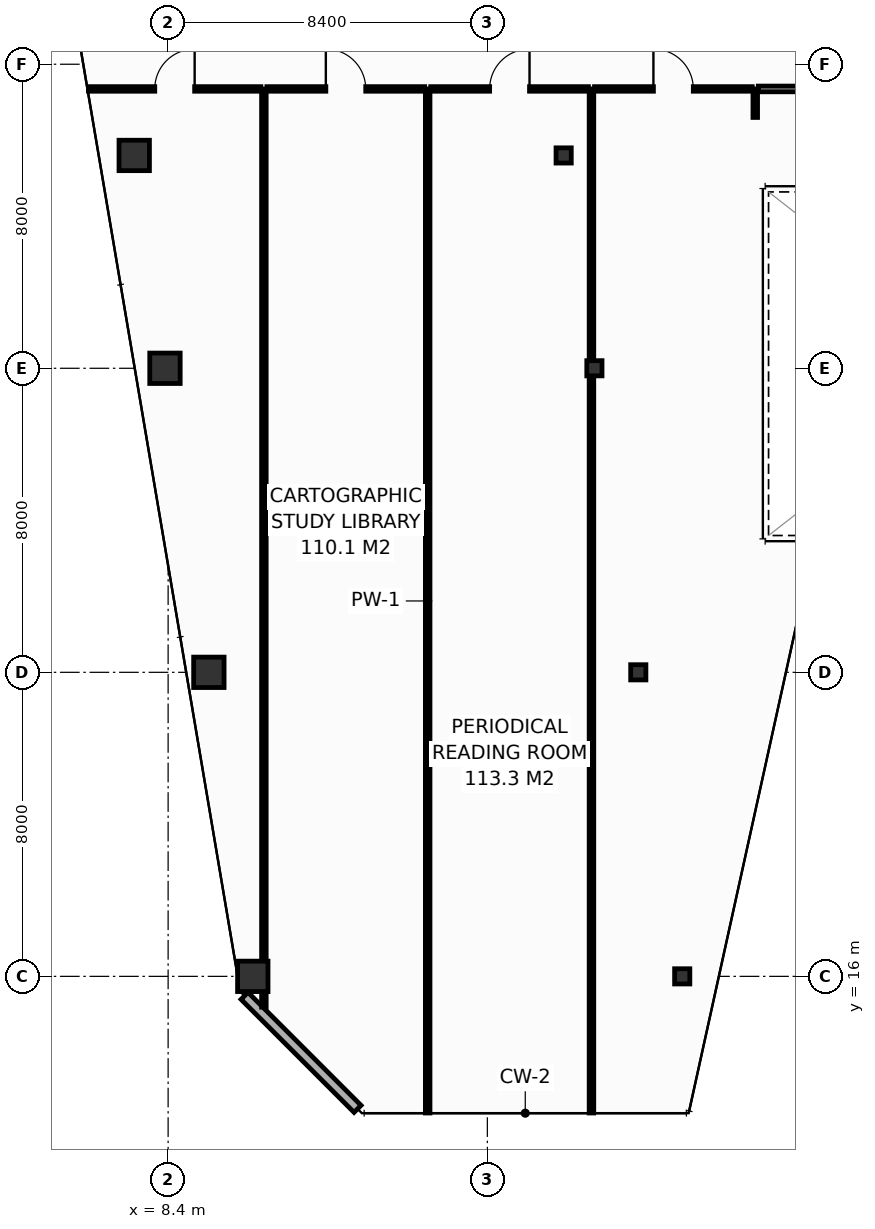
"""IFC4 building model, lengths in metres.
Left out: names, types, materials, properties, quantities, classifications, styles, units other than length and angle.
Written with IfcOpenShell. Run it as: python <this file> out.ifc"""

import sys

from ifc_helpers import new_model, si_unit, direction, frame, frame_2d, origin, origin_2d, place, context, subcontext, project, spatial, rectangle, hollow_rectangle, extrude, element, fill, save


model = new_model("IFC4")
c1 = context("Model", 3, precision=1e-05, world=origin(), true_north=direction((0.0, 1.0)))
c2 = subcontext(c1, "Body", "Model", "MODEL_VIEW")
j1 = project(units=[si_unit("LENGTHUNIT", "METRE"), si_unit("PLANEANGLEUNIT", "RADIAN")], contexts=[c1])
p1 = place(None, origin())
s1 = spatial("IfcSite", under=j1, at=p1, CompositionType="ELEMENT")
p2 = place(p1, origin())
s2 = spatial("IfcBuilding", under=s1, at=p2, CompositionType="ELEMENT")
p3 = place(p2, frame((0.0, 0.0, 194.2)))
s3 = spatial("IfcBuildingStorey", under=s2, at=p3, CompositionType="ELEMENT", Elevation=194.2)
p4 = place(p3, frame((10.628, 16.0, 0.0), z_axis=(0.0, 0.0, 1.0), x_axis=(1.0, 0.0, 0.0)))
e1 = element("IfcColumn", 1, at=p4, inside=s3, PredefinedType="COLUMN", context=c2, shape_type="SweptSolid", body=[
    extrude(hollow_rectangle(XDim=0.8, YDim=0.8, WallThickness=0.036, at=origin_2d()), origin(), (0.0, 0.0, 1.0), 3.8),
])
p5 = place(p3, frame((21.928, 16.0, 0.0), z_axis=(0.0, 0.0, 1.0), x_axis=(1.0, 0.0, 0.0)))
e2 = element("IfcColumn", 2, at=p5, inside=s3, PredefinedType="COLUMN", context=c2, shape_type="SweptSolid", body=[
    extrude(hollow_rectangle(XDim=0.4, YDim=0.4, WallThickness=0.016, at=origin_2d()), origin(), (0.0, 0.0, 1.0), 3.8),
])
p6 = place(p3, frame((9.472, 24.0, 0.0), z_axis=(0.0, 0.0, 1.0), x_axis=(1.0, 0.0, 0.0)))
e3 = element("IfcColumn", 3, at=p6, inside=s3, PredefinedType="COLUMN", context=c2, shape_type="SweptSolid", body=[
    extrude(hollow_rectangle(XDim=0.8, YDim=0.8, WallThickness=0.036, at=origin_2d()), origin(), (0.0, 0.0, 1.0), 3.8),
])
p7 = place(p3, frame((20.772, 24.0, 0.0), z_axis=(0.0, 0.0, 1.0), x_axis=(1.0, 0.0, 0.0)))
e4 = element("IfcColumn", 4, at=p7, inside=s3, PredefinedType="COLUMN", context=c2, shape_type="SweptSolid", body=[
    extrude(hollow_rectangle(XDim=0.4, YDim=0.4, WallThickness=0.016, at=origin_2d()), origin(), (0.0, 0.0, 1.0), 3.8),
])
p8 = place(p3, frame((8.317, 32.0, 0.0), z_axis=(0.0, 0.0, 1.0), x_axis=(1.0, 0.0, 0.0)))
e5 = element("IfcColumn", 5, at=p8, inside=s3, PredefinedType="COLUMN", context=c2, shape_type="SweptSolid", body=[
    extrude(hollow_rectangle(XDim=0.8, YDim=0.8, WallThickness=0.036, at=origin_2d()), origin(), (0.0, 0.0, 1.0), 3.8),
])
p9 = place(p3, frame((19.617, 32.0, 0.0), z_axis=(0.0, 0.0, 1.0), x_axis=(1.0, 0.0, 0.0)))
e6 = element("IfcColumn", 6, at=p9, inside=s3, PredefinedType="COLUMN", context=c2, shape_type="SweptSolid", body=[
    extrude(hollow_rectangle(XDim=0.4, YDim=0.4, WallThickness=0.016, at=origin_2d()), origin(), (0.0, 0.0, 1.0), 3.8),
])
p10 = place(p3, frame((7.508, 37.6, 0.0), z_axis=(0.0, 0.0, 1.0), x_axis=(1.0, 0.0, 0.0)))
e7 = element("IfcColumn", 7, at=p10, inside=s3, PredefinedType="COLUMN", context=c2, shape_type="SweptSolid", body=[
    extrude(hollow_rectangle(XDim=0.8, YDim=0.8, WallThickness=0.036, at=origin_2d()), origin(), (0.0, 0.0, 1.0), 3.8),
])
p11 = place(p3, frame((18.808, 37.6, 0.0), z_axis=(0.0, 0.0, 1.0), x_axis=(1.0, 0.0, 0.0)))
e8 = element("IfcColumn", 8, at=p11, inside=s3, PredefinedType="COLUMN", context=c2, shape_type="SweptSolid", body=[
    extrude(hollow_rectangle(XDim=0.4, YDim=0.4, WallThickness=0.016, at=origin_2d()), origin(), (0.0, 0.0, 1.0), 3.8),
])
p12 = place(p3, frame((10.411, 15.487, 0.0), z_axis=(0.0, 0.0, 1.0), x_axis=(0.707135806771, -0.70707775441, 0.0)))
e9 = element("IfcWall", 9, at=p12, inside=s3, PredefinedType="STANDARD", context=c2, shape_type="SweptSolid", body=[
    extrude(rectangle(XDim=4.206, YDim=0.26, at=frame_2d((2.103, 0.0))), origin(), (0.0, 0.0, 1.0), 3.55),
])
p13 = place(p3, frame((10.92, 15.19, 0.0), z_axis=(0.0, 0.0, 1.0), x_axis=(0.0, 1.0, 0.0)))
e10 = element("IfcWall", 10, at=p13, inside=s3, PredefinedType="PARTITIONING", context=c2, shape_type="SweptSolid", body=[
    extrude(rectangle(XDim=24.16, YDim=0.12, at=frame_2d((12.08, 0.0))), origin(), (0.0, 0.0, 1.0), 2.835),
])
for number, where, z_axis, x_axis in (
    (11, (15.23, 12.405, 0.0), (0.0, 0.0, 1.0), (0.0, 1.0, 0.0)),
    (12, (19.54, 12.405, 0.0), (0.0, 0.0, 1.0), (0.0, 1.0, 0.0)),
):
    element("IfcWall", number, at=place(p3, frame(where, z_axis=z_axis, x_axis=x_axis)), inside=s3, PredefinedType="PARTITIONING", context=c2, shape_type="SweptSolid", body=[
        extrude(rectangle(XDim=26.945, YDim=0.12, at=frame_2d((13.473, 0.0))), origin(), (0.0, 0.0, 1.0), 2.835),
    ])
p14 = place(p3, frame((23.85, 38.6, 0.0), z_axis=(0.0, 0.0, 1.0), x_axis=(0.0, 1.0, 0.0)))
e13 = element("IfcWall", 13, at=p14, inside=s3, PredefinedType="PARTITIONING", context=c2, shape_type="SweptSolid", body=[
    extrude(rectangle(XDim=0.75, YDim=0.12, at=frame_2d((0.375, 0.0))), origin(), (0.0, 0.0, 1.0), 3.55),
])
p15 = place(p3, frame((6.305, 39.35, 0.0), z_axis=(0.0, 0.0, 1.0), x_axis=(1.0, 0.0, 0.0)))
e14 = element("IfcWall", 14, at=p15, inside=s3, PredefinedType="PARTITIONING", context=c2, shape_type="SweptSolid", body=[
    extrude(rectangle(XDim=4.535, YDim=0.12, at=frame_2d((2.268, 0.0))), origin(), (0.0, 0.0, 1.0), 3.035),
])
p16 = place(p15, frame((1.743, 0.0, 0.0)))
e15 = element("IfcOpeningElement", 15, at=p16, cuts=e14, PredefinedType="OPENING", context=c2, shape_type="SweptSolid", body=[
    extrude(rectangle(XDim=1.05, YDim=2.15, at=frame_2d((0.525, 1.075))), frame((0.0, 0.07, 0.0), z_axis=(0.0, -1.0, 0.0), x_axis=(1.0, 0.0, 0.0)), (0.0, 0.0, 1.0), 0.14),
])
p17 = place(p3, frame((11.0, 39.35, 0.0), z_axis=(0.0, 0.0, 1.0), x_axis=(1.0, 0.0, 0.0)))
e16 = element("IfcWall", 16, at=p17, inside=s3, PredefinedType="PARTITIONING", context=c2, shape_type="SweptSolid", body=[
    extrude(rectangle(XDim=4.15, YDim=0.12, at=frame_2d((2.075, 0.0))), origin(), (0.0, 0.0, 1.0), 3.55),
])
p18 = place(p17, frame((1.55, 0.0, 0.0)))
e17 = element("IfcOpeningElement", 17, at=p18, cuts=e16, PredefinedType="OPENING", context=c2, shape_type="SweptSolid", body=[
    extrude(rectangle(XDim=1.05, YDim=2.15, at=frame_2d((0.525, 1.075))), frame((0.0, 0.07, 0.0), z_axis=(0.0, -1.0, 0.0), x_axis=(1.0, 0.0, 0.0)), (0.0, 0.0, 1.0), 0.14),
])
p19 = place(p3, frame((15.31, 39.35, 0.0), z_axis=(0.0, 0.0, 1.0), x_axis=(1.0, 0.0, 0.0)))
e18 = element("IfcWall", 18, at=p19, inside=s3, PredefinedType="PARTITIONING", context=c2, shape_type="SweptSolid", body=[
    extrude(rectangle(XDim=4.15, YDim=0.12, at=frame_2d((2.075, 0.0))), origin(), (0.0, 0.0, 1.0), 3.55),
])
p20 = place(p19, frame((1.55, 0.0, 0.0)))
e19 = element("IfcOpeningElement", 19, at=p20, cuts=e18, PredefinedType="OPENING", context=c2, shape_type="SweptSolid", body=[
    extrude(rectangle(XDim=1.05, YDim=2.15, at=frame_2d((0.525, 1.075))), frame((0.0, 0.07, 0.0), z_axis=(0.0, -1.0, 0.0), x_axis=(1.0, 0.0, 0.0)), (0.0, 0.0, 1.0), 0.14),
])
p21 = place(p3, frame((19.62, 39.35, 0.0), z_axis=(0.0, 0.0, 1.0), x_axis=(1.0, 0.0, 0.0)))
e20 = element("IfcWall", 20, at=p21, inside=s3, PredefinedType="PARTITIONING", context=c2, shape_type="SweptSolid", body=[
    extrude(rectangle(XDim=4.15, YDim=0.12, at=frame_2d((2.075, 0.0))), origin(), (0.0, 0.0, 1.0), 2.835),
])
p22 = place(p21, frame((1.55, 0.0, 0.0)))
e21 = element("IfcOpeningElement", 21, at=p22, cuts=e20, PredefinedType="OPENING", context=c2, shape_type="SweptSolid", body=[
    extrude(rectangle(XDim=1.05, YDim=2.15, at=frame_2d((0.525, 1.075))), frame((0.0, 0.07, 0.0), z_axis=(0.0, -1.0, 0.0), x_axis=(1.0, 0.0, 0.0)), (0.0, 0.0, 1.0), 0.14),
])
p23 = place(p3, frame((23.93, 39.35, 0.0), z_axis=(0.0, 0.0, 1.0), x_axis=(1.0, 0.0, 0.0)))
e22 = element("IfcWall", 22, at=p23, inside=s3, PredefinedType="PARTITIONING", context=c2, shape_type="SweptSolid", body=[
    extrude(rectangle(XDim=12.14, YDim=0.15, at=frame_2d((6.07, 0.0))), origin(), (0.0, 0.0, 1.0), 3.55),
])
p24 = place(p16, origin())
e23 = element("IfcDoor", 23, at=p24, inside=s3, OperationType="SINGLE_SWING_RIGHT", PredefinedType="DOOR", context=c2, shape_type="SweptSolid", body=[
    extrude(rectangle(XDim=1.05, YDim=2.15, at=frame_2d((0.525, 1.075))), frame((0.0, 0.025, 0.0), z_axis=(0.0, -1.0, 0.0), x_axis=(1.0, 0.0, 0.0)), (0.0, 0.0, 1.0), 0.05),
])
fill(e15, e23)
p25 = place(p18, origin())
e24 = element("IfcDoor", 24, at=p25, inside=s3, OperationType="SINGLE_SWING_LEFT", PredefinedType="DOOR", context=c2, shape_type="SweptSolid", body=[
    extrude(rectangle(XDim=1.05, YDim=2.15, at=frame_2d((0.525, 1.075))), frame((0.0, 0.025, 0.0), z_axis=(0.0, -1.0, 0.0), x_axis=(1.0, 0.0, 0.0)), (0.0, 0.0, 1.0), 0.05),
])
fill(e17, e24)
p26 = place(p20, origin())
e25 = element("IfcDoor", 25, at=p26, inside=s3, OperationType="SINGLE_SWING_RIGHT", PredefinedType="DOOR", context=c2, shape_type="SweptSolid", body=[
    extrude(rectangle(XDim=1.05, YDim=2.15, at=frame_2d((0.525, 1.075))), frame((0.0, 0.025, 0.0), z_axis=(0.0, -1.0, 0.0), x_axis=(1.0, 0.0, 0.0)), (0.0, 0.0, 1.0), 0.05),
])
fill(e19, e25)
p27 = place(p22, origin())
e26 = element("IfcDoor", 26, at=p27, inside=s3, OperationType="SINGLE_SWING_LEFT", PredefinedType="DOOR", context=c2, shape_type="SweptSolid", body=[
    extrude(rectangle(XDim=1.05, YDim=2.15, at=frame_2d((0.525, 1.075))), frame((0.0, 0.025, 0.0), z_axis=(0.0, -1.0, 0.0), x_axis=(1.0, 0.0, 0.0)), (0.0, 0.0, 1.0), 0.05),
])
fill(e21, e26)
save(model, sys.argv[1])
